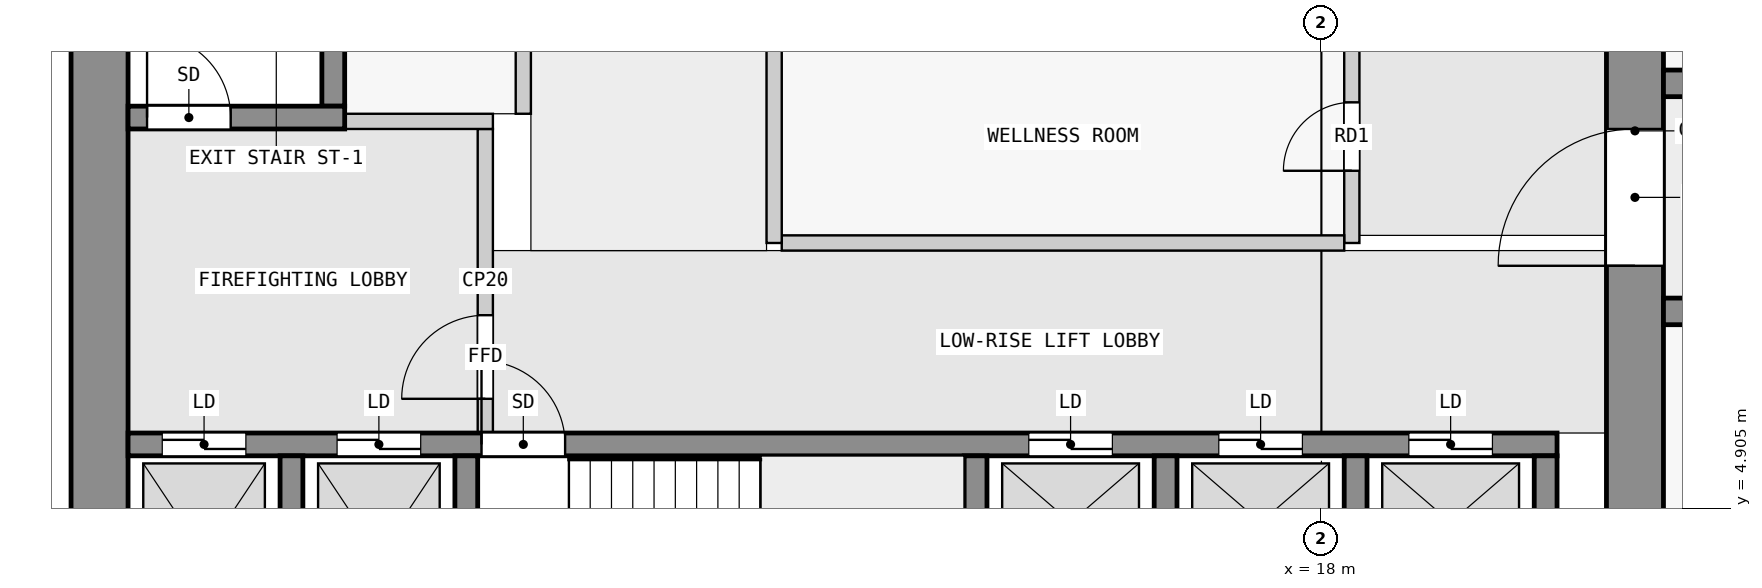
"""IFC4 building model, lengths in metres.
Left out: names, types, materials, properties, quantities, classifications, styles, units other than length and angle.
Written with IfcOpenShell. Run it as: python <this file> out.ifc"""

import sys

from ifc_helpers import new_model, si_unit, direction, frame, frame_2d, origin, place, context, subcontext, project, spatial, rectangle, extrude, element, fill, save


model = new_model("IFC4")
c1 = context("Model", 3, precision=1e-05, world=origin(), true_north=direction((0.0, 1.0)))
c2 = subcontext(c1, "Body", "Model", "MODEL_VIEW")
j1 = project(units=[si_unit("LENGTHUNIT", "METRE"), si_unit("PLANEANGLEUNIT", "RADIAN")], contexts=[c1])
p1 = place(None, origin())
s1 = spatial("IfcSite", under=j1, at=p1, CompositionType="ELEMENT")
p2 = place(p1, origin())
s2 = spatial("IfcBuilding", under=s1, at=p2, CompositionType="ELEMENT")
p3 = place(p2, frame((0.0, 0.0, 33.8)))
s3 = spatial("IfcBuildingStorey", under=s2, at=p3, CompositionType="ELEMENT", Elevation=33.8)
p4 = place(p3, frame((1.925, 2.5, 0.0), z_axis=(0.0, 0.0, 1.0), x_axis=(0.0, 1.0, 0.0)))
e1 = element("IfcWall", 1, at=p4, inside=s3, PredefinedType="SHEAR", context=c2, shape_type="SweptSolid", body=[
    extrude(rectangle(XDim=14.75, YDim=0.75, at=frame_2d((7.375, 0.0))), origin(), (0.0, 0.0, 1.0), 3.25),
])
p5 = place(p3, frame((22.125, 2.5, 0.0), z_axis=(0.0, 0.0, 1.0), x_axis=(0.0, 1.0, 0.0)))
e2 = element("IfcWall", 2, at=p5, inside=s3, PredefinedType="SHEAR", context=c2, shape_type="SweptSolid", body=[
    extrude(rectangle(XDim=14.75, YDim=0.75, at=frame_2d((7.375, 0.0))), origin(), (0.0, 0.0, 1.0), 3.25),
])
p6 = place(p5, frame((5.6, 0.0, 0.0)))
e3 = element("IfcOpeningElement", 3, at=p6, cuts=e2, PredefinedType="OPENING", context=c2, shape_type="SweptSolid", body=[
    extrude(rectangle(XDim=1.8, YDim=2.1, at=frame_2d((0.9, 1.05))), frame((0.0, 0.385, 0.0), z_axis=(0.0, -1.0, 0.0), x_axis=(1.0, 0.0, 0.0)), (0.0, 0.0, 1.0), 0.77),
])
for number, where, z_axis, x_axis in (
    (4, (4.45, 2.8, 0.0), (0.0, 0.0, 1.0), (0.0, 1.0, 0.0)),
    (5, (6.75, 2.8, 0.0), (0.0, 0.0, 1.0), (0.0, 1.0, 0.0)),
    (6, (13.45, 2.8, 0.0), (0.0, 0.0, 1.0), (0.0, 1.0, 0.0)),
    (7, (15.95, 2.8, 0.0), (0.0, 0.0, 1.0), (0.0, 1.0, 0.0)),
    (8, (18.45, 2.8, 0.0), (0.0, 0.0, 1.0), (0.0, 1.0, 0.0)),
    (9, (20.95, 2.8, 0.0), (0.0, 0.0, 1.0), (0.0, 1.0, 0.0)),
):
    element("IfcWall", number, at=place(p3, frame(where, z_axis=z_axis, x_axis=x_axis)), inside=s3, PredefinedType="SHEAR", context=c2, shape_type="SweptSolid", body=[
        extrude(rectangle(XDim=2.8, YDim=0.3, at=frame_2d((1.4, 0.0))), origin(), (0.0, 0.0, 1.0), 3.25),
    ])
p7 = place(p3, frame((2.3, 5.75, 0.0), z_axis=(0.0, 0.0, 1.0), x_axis=(1.0, 0.0, 0.0)))
e10 = element("IfcWall", 10, at=p7, inside=s3, PredefinedType="SHEAR", context=c2, shape_type="SweptSolid", body=[
    extrude(rectangle(XDim=18.8, YDim=0.3, at=frame_2d((9.4, 0.0))), origin(), (0.0, 0.0, 1.0), 3.25),
])
p8 = place(p7, frame((4.65, 0.0, 0.0)))
e11 = element("IfcOpeningElement", 11, at=p8, cuts=e10, PredefinedType="OPENING", context=c2, shape_type="SweptSolid", body=[
    extrude(rectangle(XDim=1.1, YDim=2.1, at=frame_2d((0.55, 1.05))), frame((0.0, 0.16, 0.0), z_axis=(0.0, -1.0, 0.0), x_axis=(1.0, 0.0, 0.0)), (0.0, 0.0, 1.0), 0.32),
])
p9 = place(p7, frame((0.45, 0.0, 0.0)))
e12 = element("IfcOpeningElement", 12, at=p9, cuts=e10, PredefinedType="OPENING", context=c2, shape_type="SweptSolid", body=[
    extrude(rectangle(XDim=1.1, YDim=2.1, at=frame_2d((0.55, 1.05))), frame((0.0, 0.16, 0.0), z_axis=(0.0, -1.0, 0.0), x_axis=(1.0, 0.0, 0.0)), (0.0, 0.0, 1.0), 0.32),
])
p10 = place(p7, frame((2.75, 0.0, 0.0)))
e13 = element("IfcOpeningElement", 13, at=p10, cuts=e10, PredefinedType="OPENING", context=c2, shape_type="SweptSolid", body=[
    extrude(rectangle(XDim=1.1, YDim=2.1, at=frame_2d((0.55, 1.05))), frame((0.0, 0.16, 0.0), z_axis=(0.0, -1.0, 0.0), x_axis=(1.0, 0.0, 0.0)), (0.0, 0.0, 1.0), 0.32),
])
p11 = place(p7, frame((11.85, 0.0, 0.0)))
e14 = element("IfcOpeningElement", 14, at=p11, cuts=e10, PredefinedType="OPENING", context=c2, shape_type="SweptSolid", body=[
    extrude(rectangle(XDim=1.1, YDim=2.1, at=frame_2d((0.55, 1.05))), frame((0.0, 0.16, 0.0), z_axis=(0.0, -1.0, 0.0), x_axis=(1.0, 0.0, 0.0)), (0.0, 0.0, 1.0), 0.32),
])
p12 = place(p7, frame((14.35, 0.0, 0.0)))
e15 = element("IfcOpeningElement", 15, at=p12, cuts=e10, PredefinedType="OPENING", context=c2, shape_type="SweptSolid", body=[
    extrude(rectangle(XDim=1.1, YDim=2.1, at=frame_2d((0.55, 1.05))), frame((0.0, 0.16, 0.0), z_axis=(0.0, -1.0, 0.0), x_axis=(1.0, 0.0, 0.0)), (0.0, 0.0, 1.0), 0.32),
])
p13 = place(p7, frame((16.85, 0.0, 0.0)))
e16 = element("IfcOpeningElement", 16, at=p13, cuts=e10, PredefinedType="OPENING", context=c2, shape_type="SweptSolid", body=[
    extrude(rectangle(XDim=1.1, YDim=2.1, at=frame_2d((0.55, 1.05))), frame((0.0, 0.16, 0.0), z_axis=(0.0, -1.0, 0.0), x_axis=(1.0, 0.0, 0.0)), (0.0, 0.0, 1.0), 0.32),
])
p14 = place(p3, frame((2.3, 10.05, 0.0), z_axis=(0.0, 0.0, 1.0), x_axis=(1.0, 0.0, 0.0)))
e17 = element("IfcWall", 17, at=p14, inside=s3, PredefinedType="SHEAR", context=c2, shape_type="SweptSolid", body=[
    extrude(rectangle(XDim=2.85, YDim=0.3, at=frame_2d((1.425, 0.0))), origin(), (0.0, 0.0, 1.0), 3.25),
])
p15 = place(p14, frame((0.25, 0.0, 0.0)))
e18 = element("IfcOpeningElement", 18, at=p15, cuts=e17, PredefinedType="OPENING", context=c2, shape_type="SweptSolid", body=[
    extrude(rectangle(XDim=1.1, YDim=2.1, at=frame_2d((0.55, 1.05))), frame((0.0, 0.16, 0.0), z_axis=(0.0, -1.0, 0.0), x_axis=(1.0, 0.0, 0.0)), (0.0, 0.0, 1.0), 0.32),
])
p16 = place(p3, frame((5.0, 10.2, 0.0), z_axis=(0.0, 0.0, 1.0), x_axis=(0.0, 1.0, 0.0)))
e19 = element("IfcWall", 19, at=p16, inside=s3, PredefinedType="SHEAR", context=c2, shape_type="SweptSolid", body=[
    extrude(rectangle(XDim=6.4, YDim=0.3, at=frame_2d((3.2, 0.0))), origin(), (0.0, 0.0, 1.0), 3.25),
])
p17 = place(p3, frame((22.5, 7.5, 0.0), z_axis=(0.0, 0.0, 1.0), x_axis=(1.0, 0.0, 0.0)))
e20 = element("IfcWall", 20, at=p17, inside=s3, PredefinedType="SHEAR", context=c2, shape_type="SweptSolid", body=[
    extrude(rectangle(XDim=22.5, YDim=0.35, at=frame_2d((11.25, 0.0))), origin(), (0.0, 0.0, 1.0), 3.25),
])
p18 = place(p17, frame((1.75, 0.0, 0.0)))
e21 = element("IfcOpeningElement", 21, at=p18, cuts=e20, PredefinedType="OPENING", context=c2, shape_type="SweptSolid", body=[
    extrude(rectangle(XDim=1.0, YDim=2.1, at=frame_2d((0.5, 1.05))), frame((0.0, 0.185, 0.0), z_axis=(0.0, -1.0, 0.0), x_axis=(1.0, 0.0, 0.0)), (0.0, 0.0, 1.0), 0.37),
])
p19 = place(p17, frame((9.25, 0.0, 0.0)))
e22 = element("IfcOpeningElement", 22, at=p19, cuts=e20, PredefinedType="OPENING", context=c2, shape_type="SweptSolid", body=[
    extrude(rectangle(XDim=1.0, YDim=2.1, at=frame_2d((0.5, 1.05))), frame((0.0, 0.185, 0.0), z_axis=(0.0, -1.0, 0.0), x_axis=(1.0, 0.0, 0.0)), (0.0, 0.0, 1.0), 0.37),
])
p20 = place(p17, frame((18.75, 0.0, 0.0)))
e23 = element("IfcOpeningElement", 23, at=p20, cuts=e20, PredefinedType="OPENING", context=c2, shape_type="SweptSolid", body=[
    extrude(rectangle(XDim=0.9, YDim=2.1, at=frame_2d((0.45, 1.05))), frame((0.0, 0.185, 0.0), z_axis=(0.0, -1.0, 0.0), x_axis=(1.0, 0.0, 0.0)), (0.0, 0.0, 1.0), 0.37),
])
p21 = place(p17, frame((20.95, 0.0, 0.0)))
e24 = element("IfcOpeningElement", 24, at=p21, cuts=e20, PredefinedType="OPENING", context=c2, shape_type="SweptSolid", body=[
    extrude(rectangle(XDim=1.0, YDim=2.1, at=frame_2d((0.5, 1.05))), frame((0.0, 0.185, 0.0), z_axis=(0.0, -1.0, 0.0), x_axis=(1.0, 0.0, 0.0)), (0.0, 0.0, 1.0), 0.37),
])
p22 = place(p3, frame((22.5, 10.5, 0.0), z_axis=(0.0, 0.0, 1.0), x_axis=(1.0, 0.0, 0.0)))
e25 = element("IfcWall", 25, at=p22, inside=s3, PredefinedType="SHEAR", context=c2, shape_type="SweptSolid", body=[
    extrude(rectangle(XDim=22.5, YDim=0.35, at=frame_2d((11.25, 0.0))), origin(), (0.0, 0.0, 1.0), 3.25),
])
p23 = place(p22, frame((1.75, 0.0, 0.0)))
e26 = element("IfcOpeningElement", 26, at=p23, cuts=e25, PredefinedType="OPENING", context=c2, shape_type="SweptSolid", body=[
    extrude(rectangle(XDim=1.0, YDim=2.1, at=frame_2d((0.5, 1.05))), frame((0.0, 0.185, 0.0), z_axis=(0.0, -1.0, 0.0), x_axis=(1.0, 0.0, 0.0)), (0.0, 0.0, 1.0), 0.37),
])
p24 = place(p22, frame((6.25, 0.0, 0.0)))
e27 = element("IfcOpeningElement", 27, at=p24, cuts=e25, PredefinedType="OPENING", context=c2, shape_type="SweptSolid", body=[
    extrude(rectangle(XDim=1.0, YDim=2.1, at=frame_2d((0.5, 1.05))), frame((0.0, 0.185, 0.0), z_axis=(0.0, -1.0, 0.0), x_axis=(1.0, 0.0, 0.0)), (0.0, 0.0, 1.0), 0.37),
])
p25 = place(p22, frame((10.75, 0.0, 0.0)))
e28 = element("IfcOpeningElement", 28, at=p25, cuts=e25, PredefinedType="OPENING", context=c2, shape_type="SweptSolid", body=[
    extrude(rectangle(XDim=1.0, YDim=2.1, at=frame_2d((0.5, 1.05))), frame((0.0, 0.185, 0.0), z_axis=(0.0, -1.0, 0.0), x_axis=(1.0, 0.0, 0.0)), (0.0, 0.0, 1.0), 0.37),
])
p26 = place(p22, frame((16.85, 0.0, 0.0)))
e29 = element("IfcOpeningElement", 29, at=p26, cuts=e25, PredefinedType="OPENING", context=c2, shape_type="SweptSolid", body=[
    extrude(rectangle(XDim=1.0, YDim=2.1, at=frame_2d((0.5, 1.05))), frame((0.0, 0.185, 0.0), z_axis=(0.0, -1.0, 0.0), x_axis=(1.0, 0.0, 0.0)), (0.0, 0.0, 1.0), 0.37),
])
p27 = place(p3, frame((7.0, 5.9, 0.0), z_axis=(0.0, 0.0, 1.0), x_axis=(0.0, 1.0, 0.0)))
e30 = element("IfcWall", 30, at=p27, inside=s3, PredefinedType="PARTITIONING", context=c2, shape_type="SweptSolid", body=[
    extrude(rectangle(XDim=4.0, YDim=0.2, at=frame_2d((2.0, 0.0))), origin(), (0.0, 0.0, 1.0), 3.25),
])
p28 = place(p27, frame((0.45, 0.0, 0.0)))
e31 = element("IfcOpeningElement", 31, at=p28, cuts=e30, PredefinedType="OPENING", context=c2, shape_type="SweptSolid", body=[
    extrude(rectangle(XDim=1.1, YDim=2.1, at=frame_2d((0.55, 1.05))), frame((0.0, 0.11, 0.0), z_axis=(0.0, -1.0, 0.0), x_axis=(1.0, 0.0, 0.0)), (0.0, 0.0, 1.0), 0.22),
])
p29 = place(p3, frame((5.15, 10.0, 0.0), z_axis=(0.0, 0.0, 1.0), x_axis=(1.0, 0.0, 0.0)))
e32 = element("IfcWall", 32, at=p29, inside=s3, PredefinedType="PARTITIONING", context=c2, shape_type="SweptSolid", body=[
    extrude(rectangle(XDim=1.95, YDim=0.2, at=frame_2d((0.975, 0.0))), origin(), (0.0, 0.0, 1.0), 3.25),
])
p30 = place(p3, frame((10.8, 8.4, 0.0), z_axis=(0.0, 0.0, 1.0), x_axis=(0.0, 1.0, 0.0)))
e33 = element("IfcWall", 33, at=p30, inside=s3, PredefinedType="PARTITIONING", context=c2, shape_type="SweptSolid", body=[
    extrude(rectangle(XDim=6.2, YDim=0.2, at=frame_2d((3.1, 0.0))), origin(), (0.0, 0.0, 1.0), 3.25),
])
p31 = place(p3, frame((10.9, 8.4, 0.0), z_axis=(0.0, 0.0, 1.0), x_axis=(1.0, 0.0, 0.0)))
e34 = element("IfcWall", 34, at=p31, inside=s3, PredefinedType="PARTITIONING", context=c2, shape_type="SweptSolid", body=[
    extrude(rectangle(XDim=7.4, YDim=0.2, at=frame_2d((3.7, 0.0))), origin(), (0.0, 0.0, 1.0), 3.25),
])
p32 = place(p3, frame((18.4, 8.4, 0.0), z_axis=(0.0, 0.0, 1.0), x_axis=(0.0, 1.0, 0.0)))
e35 = element("IfcWall", 35, at=p32, inside=s3, PredefinedType="PARTITIONING", context=c2, shape_type="SweptSolid", body=[
    extrude(rectangle(XDim=6.2, YDim=0.2, at=frame_2d((3.1, 0.0))), origin(), (0.0, 0.0, 1.0), 3.25),
])
p33 = place(p32, frame((0.95, 0.0, 0.0)))
e36 = element("IfcOpeningElement", 36, at=p33, cuts=e35, PredefinedType="OPENING", context=c2, shape_type="SweptSolid", body=[
    extrude(rectangle(XDim=0.9, YDim=2.1, at=frame_2d((0.45, 1.05))), frame((0.0, 0.11, 0.0), z_axis=(0.0, -1.0, 0.0), x_axis=(1.0, 0.0, 0.0)), (0.0, 0.0, 1.0), 0.22),
])
p34 = place(p32, frame((4.05, 0.0, 0.0)))
e37 = element("IfcOpeningElement", 37, at=p34, cuts=e35, PredefinedType="OPENING", context=c2, shape_type="SweptSolid", body=[
    extrude(rectangle(XDim=0.9, YDim=2.1, at=frame_2d((0.45, 1.05))), frame((0.0, 0.11, 0.0), z_axis=(0.0, -1.0, 0.0), x_axis=(1.0, 0.0, 0.0)), (0.0, 0.0, 1.0), 0.22),
])
p35 = place(p3, frame((7.5, 10.1, 0.0), z_axis=(0.0, 0.0, 1.0), x_axis=(0.0, 1.0, 0.0)))
e38 = element("IfcWall", 38, at=p35, inside=s3, PredefinedType="PARTITIONING", context=c2, shape_type="SweptSolid", body=[
    extrude(rectangle(XDim=7.15, YDim=0.2, at=frame_2d((3.575, 0.0))), origin(), (0.0, 0.0, 1.0), 3.25),
])
p36 = place(p35, frame((1.05, 0.0, 0.0)))
e39 = element("IfcOpeningElement", 39, at=p36, cuts=e38, PredefinedType="OPENING", context=c2, shape_type="SweptSolid", body=[
    extrude(rectangle(XDim=0.9, YDim=2.1, at=frame_2d((0.45, 1.05))), frame((0.0, 0.11, 0.0), z_axis=(0.0, -1.0, 0.0), x_axis=(1.0, 0.0, 0.0)), (0.0, 0.0, 1.0), 0.22),
])
p37 = place(p35, frame((4.625, 0.0, 0.0)))
e40 = element("IfcOpeningElement", 40, at=p37, cuts=e38, PredefinedType="OPENING", context=c2, shape_type="SweptSolid", body=[
    extrude(rectangle(XDim=0.9, YDim=2.1, at=frame_2d((0.45, 1.05))), frame((0.0, 0.11, 0.0), z_axis=(0.0, -1.0, 0.0), x_axis=(1.0, 0.0, 0.0)), (0.0, 0.0, 1.0), 0.22),
])
p38 = place(p28, origin())
e41 = element("IfcDoor", 41, at=p38, inside=s3, OperationType="SINGLE_SWING_LEFT", PredefinedType="DOOR", context=c2, shape_type="SweptSolid", body=[
    extrude(rectangle(XDim=1.1, YDim=2.1, at=frame_2d((0.55, 1.05))), frame((0.0, 0.025, 0.0), z_axis=(0.0, -1.0, 0.0), x_axis=(1.0, 0.0, 0.0)), (0.0, 0.0, 1.0), 0.05),
])
fill(e31, e41)
p39 = place(p15, origin())
e42 = element("IfcDoor", 42, at=p39, inside=s3, OperationType="SINGLE_SWING_RIGHT", PredefinedType="DOOR", context=c2, shape_type="SweptSolid", body=[
    extrude(rectangle(XDim=1.1, YDim=2.1, at=frame_2d((0.55, 1.05))), frame((0.0, 0.025, 0.0), z_axis=(0.0, -1.0, 0.0), x_axis=(1.0, 0.0, 0.0)), (0.0, 0.0, 1.0), 0.05),
])
fill(e18, e42)
p40 = place(p33, origin())
e43 = element("IfcDoor", 43, at=p40, inside=s3, OperationType="SINGLE_SWING_LEFT", PredefinedType="DOOR", context=c2, shape_type="SweptSolid", body=[
    extrude(rectangle(XDim=0.9, YDim=2.1, at=frame_2d((0.45, 1.05))), frame((0.0, 0.025, 0.0), z_axis=(0.0, -1.0, 0.0), x_axis=(1.0, 0.0, 0.0)), (0.0, 0.0, 1.0), 0.05),
])
fill(e36, e43)
p41 = place(p8, origin())
e44 = element("IfcDoor", 44, at=p41, inside=s3, OperationType="SINGLE_SWING_LEFT", PredefinedType="DOOR", context=c2, shape_type="SweptSolid", body=[
    extrude(rectangle(XDim=1.1, YDim=2.1, at=frame_2d((0.55, 1.05))), frame((0.0, 0.025, 0.0), z_axis=(0.0, -1.0, 0.0), x_axis=(1.0, 0.0, 0.0)), (0.0, 0.0, 1.0), 0.05),
])
fill(e11, e44)
p42 = place(p9, origin())
e45 = element("IfcDoor", 45, at=p42, inside=s3, OperationType="DOUBLE_DOOR_SLIDING", PredefinedType="DOOR", context=c2, shape_type="SweptSolid", body=[
    extrude(rectangle(XDim=1.1, YDim=2.1, at=frame_2d((0.55, 1.05))), frame((0.0, 0.025, 0.0), z_axis=(0.0, -1.0, 0.0), x_axis=(1.0, 0.0, 0.0)), (0.0, 0.0, 1.0), 0.05),
])
fill(e12, e45)
p43 = place(p10, origin())
e46 = element("IfcDoor", 46, at=p43, inside=s3, OperationType="DOUBLE_DOOR_SLIDING", PredefinedType="DOOR", context=c2, shape_type="SweptSolid", body=[
    extrude(rectangle(XDim=1.1, YDim=2.1, at=frame_2d((0.55, 1.05))), frame((0.0, 0.025, 0.0), z_axis=(0.0, -1.0, 0.0), x_axis=(1.0, 0.0, 0.0)), (0.0, 0.0, 1.0), 0.05),
])
fill(e13, e46)
p44 = place(p11, origin())
e47 = element("IfcDoor", 47, at=p44, inside=s3, OperationType="DOUBLE_DOOR_SLIDING", PredefinedType="DOOR", context=c2, shape_type="SweptSolid", body=[
    extrude(rectangle(XDim=1.1, YDim=2.1, at=frame_2d((0.55, 1.05))), frame((0.0, 0.025, 0.0), z_axis=(0.0, -1.0, 0.0), x_axis=(1.0, 0.0, 0.0)), (0.0, 0.0, 1.0), 0.05),
])
fill(e14, e47)
p45 = place(p12, origin())
e48 = element("IfcDoor", 48, at=p45, inside=s3, OperationType="DOUBLE_DOOR_SLIDING", PredefinedType="DOOR", context=c2, shape_type="SweptSolid", body=[
    extrude(rectangle(XDim=1.1, YDim=2.1, at=frame_2d((0.55, 1.05))), frame((0.0, 0.025, 0.0), z_axis=(0.0, -1.0, 0.0), x_axis=(1.0, 0.0, 0.0)), (0.0, 0.0, 1.0), 0.05),
])
fill(e15, e48)
p46 = place(p13, origin())
e49 = element("IfcDoor", 49, at=p46, inside=s3, OperationType="DOUBLE_DOOR_SLIDING", PredefinedType="DOOR", context=c2, shape_type="SweptSolid", body=[
    extrude(rectangle(XDim=1.1, YDim=2.1, at=frame_2d((0.55, 1.05))), frame((0.0, 0.025, 0.0), z_axis=(0.0, -1.0, 0.0), x_axis=(1.0, 0.0, 0.0)), (0.0, 0.0, 1.0), 0.05),
])
fill(e16, e49)
p47 = place(p6, origin())
e50 = element("IfcDoor", 50, at=p47, inside=s3, OperationType="DOUBLE_DOOR_SINGLE_SWING", PredefinedType="DOOR", context=c2, shape_type="SweptSolid", body=[
    extrude(rectangle(XDim=1.8, YDim=2.1, at=frame_2d((0.9, 1.05))), frame((0.0, 0.025, 0.0), z_axis=(0.0, -1.0, 0.0), x_axis=(1.0, 0.0, 0.0)), (0.0, 0.0, 1.0), 0.05),
])
fill(e3, e50)
save(model, sys.argv[1])
